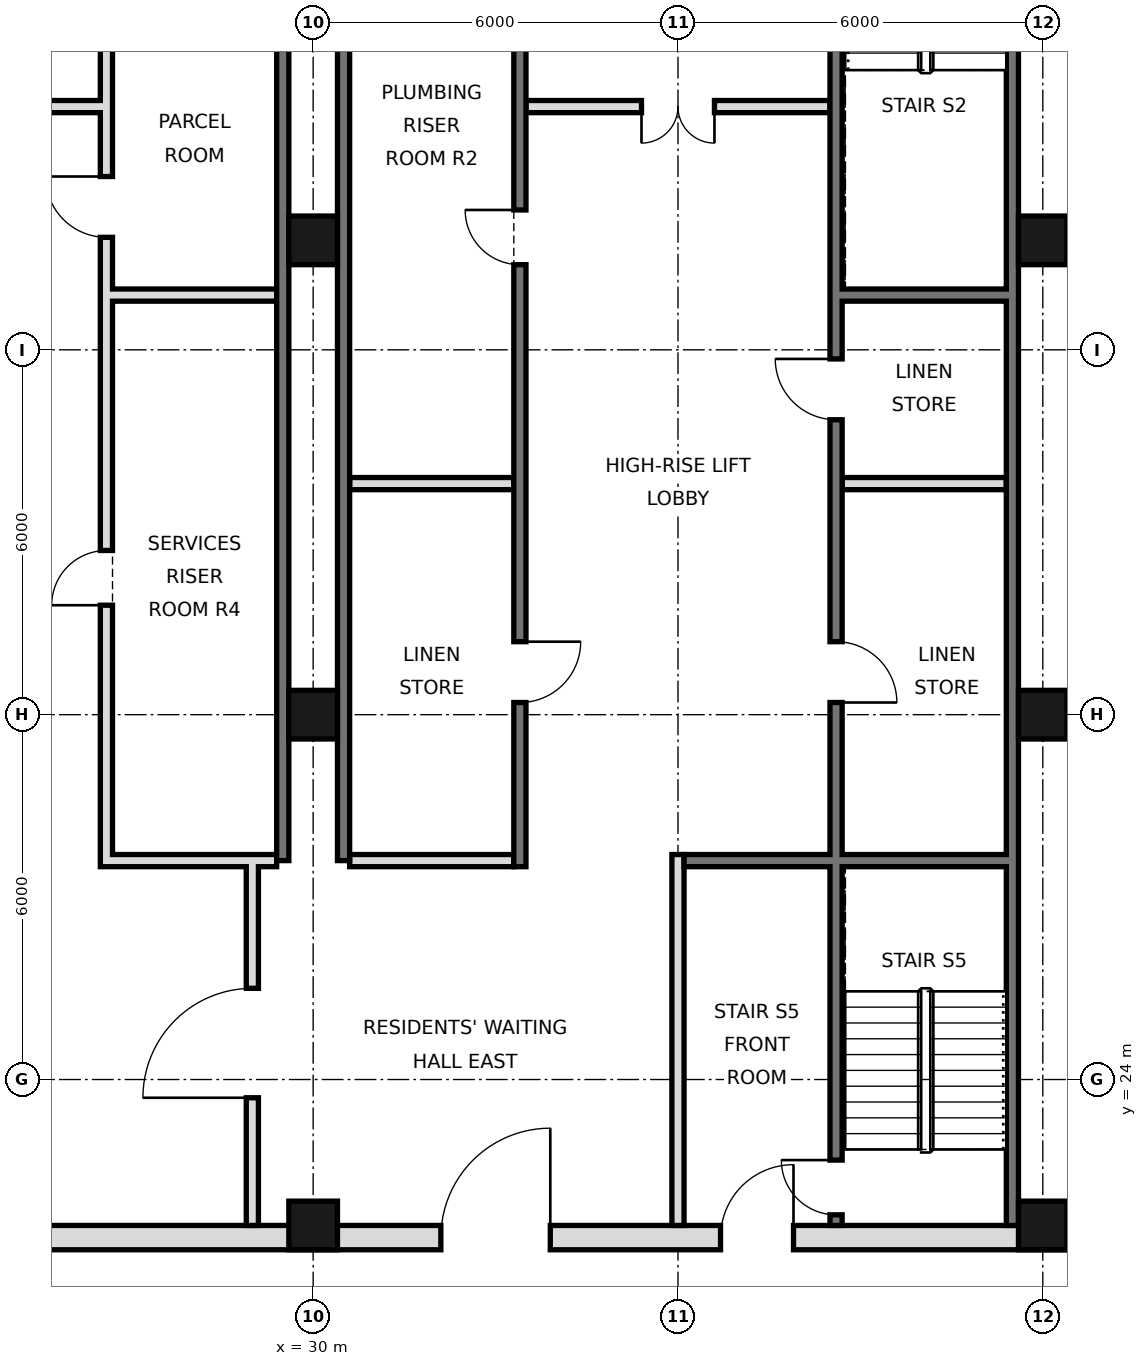
"""IFC4 building model, lengths in metres.
Left out: names, types, materials, properties, quantities, classifications, styles, units other than length and angle.
Written with IfcOpenShell. Run it as: python <this file> out.ifc"""

import sys

from ifc_helpers import new_model, si_unit, direction, frame, frame_2d, origin, origin_2d, place, context, subcontext, project, spatial, rectangle, hollow_rectangle, extrude, element, fill, save


model = new_model("IFC4")
c1 = context("Model", 3, precision=1e-05, world=origin(), true_north=direction((0.0, 1.0)))
c2 = subcontext(c1, "Body", "Model", "MODEL_VIEW")
j1 = project(units=[si_unit("LENGTHUNIT", "METRE"), si_unit("PLANEANGLEUNIT", "RADIAN")], contexts=[c1])
p1 = place(None, origin())
s1 = spatial("IfcSite", under=j1, at=p1, CompositionType="ELEMENT")
p2 = place(p1, origin())
s2 = spatial("IfcBuilding", under=s1, at=p2, CompositionType="ELEMENT")
p3 = place(p2, frame((0.0, 0.0, 130.4)))
s3 = spatial("IfcBuildingStorey", under=s2, at=p3, CompositionType="ELEMENT", Elevation=130.4)
for number, where, z_axis, x_axis in (
    (1, (30.0, 21.6, 0.0), (0.0, 0.0, 1.0), (1.0, 0.0, 0.0)),
    (2, (30.0, 30.0, 0.0), (0.0, 0.0, 1.0), (1.0, 0.0, 0.0)),
    (3, (30.0, 37.8, 0.0), (0.0, 0.0, 1.0), (1.0, 0.0, 0.0)),
    (4, (42.0, 21.6, 0.0), (0.0, 0.0, 1.0), (1.0, 0.0, 0.0)),
    (5, (42.0, 30.0, 0.0), (0.0, 0.0, 1.0), (1.0, 0.0, 0.0)),
    (6, (42.0, 37.8, 0.0), (0.0, 0.0, 1.0), (1.0, 0.0, 0.0)),
):
    element("IfcColumn", number, at=place(p3, frame(where, z_axis=z_axis, x_axis=x_axis)), inside=s3, PredefinedType="COLUMN", context=c2, shape_type="SweptSolid", body=[
        extrude(hollow_rectangle(XDim=0.8, YDim=0.8, WallThickness=0.05, at=origin_2d()), origin(), (0.0, 0.0, 1.0), 3.6),
    ])
p4 = place(p3, frame((41.5, 21.6, 0.0), z_axis=(0.0, 0.0, 1.0), x_axis=(0.0, 1.0, 0.0)))
e7 = element("IfcWall", 7, at=p4, inside=s3, PredefinedType="SOLIDWALL", context=c2, shape_type="SweptSolid", body=[
    extrude(rectangle(XDim=23.5, YDim=0.2, at=frame_2d((11.75, 0.0))), origin(), (0.0, 0.0, 1.0), 3.42),
])
for number, where, z_axis, x_axis in (
    (8, (29.5, 27.6, 0.0), (0.0, 0.0, 1.0), (0.0, 1.0, 0.0)),
    (9, (30.5, 27.6, 0.0), (0.0, 0.0, 1.0), (0.0, 1.0, 0.0)),
):
    element("IfcWall", number, at=place(p3, frame(where, z_axis=z_axis, x_axis=x_axis)), inside=s3, PredefinedType="SOLIDWALL", context=c2, shape_type="SweptSolid", body=[
        extrude(rectangle(XDim=17.5, YDim=0.2, at=frame_2d((8.75, 0.0))), origin(), (0.0, 0.0, 1.0), 3.42),
    ])
p5 = place(p3, frame((5.6, 21.4, 0.0), z_axis=(0.0, 0.0, 1.0), x_axis=(1.0, 0.0, 0.0)))
e10 = element("IfcWall", 10, at=p5, inside=s3, PredefinedType="SOLIDWALL", context=c2, shape_type="SweptSolid", body=[
    extrude(rectangle(XDim=36.8, YDim=0.4, at=frame_2d((18.4, 0.0))), origin(), (0.0, 0.0, 1.0), 3.42),
])
p6 = place(p5, frame((8.5, 0.0, 0.0)))
e11 = element("IfcOpeningElement", 11, at=p6, cuts=e10, PredefinedType="OPENING", context=c2, shape_type="SweptSolid", body=[
    extrude(rectangle(XDim=1.8, YDim=2.1, at=frame_2d((0.9, 1.05))), frame((0.0, 0.21, 0.0), z_axis=(0.0, -1.0, 0.0), x_axis=(1.0, 0.0, 0.0)), (0.0, 0.0, 1.0), 0.42),
])
p7 = place(p5, frame((17.5, 0.0, 0.0)))
e12 = element("IfcOpeningElement", 12, at=p7, cuts=e10, PredefinedType="OPENING", context=c2, shape_type="SweptSolid", body=[
    extrude(rectangle(XDim=1.8, YDim=2.1, at=frame_2d((0.9, 1.05))), frame((0.0, 0.21, 0.0), z_axis=(0.0, -1.0, 0.0), x_axis=(1.0, 0.0, 0.0)), (0.0, 0.0, 1.0), 0.42),
])
p8 = place(p5, frame((26.5, 0.0, 0.0)))
e13 = element("IfcOpeningElement", 13, at=p8, cuts=e10, PredefinedType="OPENING", context=c2, shape_type="SweptSolid", body=[
    extrude(rectangle(XDim=1.8, YDim=2.1, at=frame_2d((0.9, 1.05))), frame((0.0, 0.21, 0.0), z_axis=(0.0, -1.0, 0.0), x_axis=(1.0, 0.0, 0.0)), (0.0, 0.0, 1.0), 0.42),
])
p9 = place(p5, frame((4.5, 0.0, 0.0)))
e14 = element("IfcOpeningElement", 14, at=p9, cuts=e10, PredefinedType="OPENING", context=c2, shape_type="SweptSolid", body=[
    extrude(rectangle(XDim=1.2, YDim=2.1, at=frame_2d((0.6, 1.05))), frame((0.0, 0.21, 0.0), z_axis=(0.0, -1.0, 0.0), x_axis=(1.0, 0.0, 0.0)), (0.0, 0.0, 1.0), 0.42),
])
p10 = place(p5, frame((31.1, 0.0, 0.0)))
e15 = element("IfcOpeningElement", 15, at=p10, cuts=e10, PredefinedType="OPENING", context=c2, shape_type="SweptSolid", body=[
    extrude(rectangle(XDim=1.2, YDim=2.1, at=frame_2d((0.6, 1.05))), frame((0.0, 0.21, 0.0), z_axis=(0.0, -1.0, 0.0), x_axis=(1.0, 0.0, 0.0)), (0.0, 0.0, 1.0), 0.42),
])
p11 = place(p3, frame((29.0, 21.6, 0.0), z_axis=(0.0, 0.0, 1.0), x_axis=(0.0, 1.0, 0.0)))
e16 = element("IfcWall", 16, at=p11, inside=s3, PredefinedType="PARTITIONING", context=c2, shape_type="SweptSolid", body=[
    extrude(rectangle(XDim=6.0, YDim=0.2, at=frame_2d((3.0, 0.0))), origin(), (0.0, 0.0, 1.0), 3.42),
])
p12 = place(p11, frame((2.1, 0.0, 0.0)))
e17 = element("IfcOpeningElement", 17, at=p12, cuts=e16, PredefinedType="OPENING", context=c2, shape_type="SweptSolid", body=[
    extrude(rectangle(XDim=1.8, YDim=2.1, at=frame_2d((0.9, 1.05))), frame((0.0, 0.11, 0.0), z_axis=(0.0, -1.0, 0.0), x_axis=(1.0, 0.0, 0.0)), (0.0, 0.0, 1.0), 0.22),
])
p13 = place(p3, frame((26.6, 27.5, 0.0), z_axis=(0.0, 0.0, 1.0), x_axis=(0.0, 1.0, 0.0)))
e18 = element("IfcWall", 18, at=p13, inside=s3, PredefinedType="SOLIDWALL", context=c2, shape_type="SweptSolid", body=[
    extrude(rectangle(XDim=17.5, YDim=0.2, at=frame_2d((8.75, 0.0))), origin(), (0.0, 0.0, 1.0), 3.42),
])
p14 = place(p13, frame((4.3, 0.0, 0.0)))
e19 = element("IfcOpeningElement", 19, at=p14, cuts=e18, PredefinedType="OPENING", context=c2, shape_type="SweptSolid", body=[
    extrude(rectangle(XDim=0.9, YDim=2.1, at=frame_2d((0.45, 1.05))), frame((0.0, 0.11, 0.0), z_axis=(0.0, -1.0, 0.0), x_axis=(1.0, 0.0, 0.0)), (0.0, 0.0, 1.0), 0.22),
])
p15 = place(p13, frame((10.35, 0.0, 0.0)))
e20 = element("IfcOpeningElement", 20, at=p15, cuts=e18, PredefinedType="OPENING", context=c2, shape_type="SweptSolid", body=[
    extrude(rectangle(XDim=1.0, YDim=2.1, at=frame_2d((0.5, 1.05))), frame((0.0, 0.11, 0.0), z_axis=(0.0, -1.0, 0.0), x_axis=(1.0, 0.0, 0.0)), (0.0, 0.0, 1.0), 0.22),
])
p16 = place(p13, frame((15.475, 0.0, 0.0)))
e21 = element("IfcOpeningElement", 21, at=p16, cuts=e18, PredefinedType="OPENING", context=c2, shape_type="SweptSolid", body=[
    extrude(rectangle(XDim=1.0, YDim=2.1, at=frame_2d((0.5, 1.05))), frame((0.0, 0.11, 0.0), z_axis=(0.0, -1.0, 0.0), x_axis=(1.0, 0.0, 0.0)), (0.0, 0.0, 1.0), 0.22),
])
p17 = place(p3, frame((33.4, 27.5, 0.0), z_axis=(0.0, 0.0, 1.0), x_axis=(0.0, 1.0, 0.0)))
e22 = element("IfcWall", 22, at=p17, inside=s3, PredefinedType="SOLIDWALL", context=c2, shape_type="SweptSolid", body=[
    extrude(rectangle(XDim=17.5, YDim=0.2, at=frame_2d((8.75, 0.0))), origin(), (0.0, 0.0, 1.0), 3.42),
])
p18 = place(p17, frame((15.4, 0.0, 0.0)))
e23 = element("IfcOpeningElement", 23, at=p18, cuts=e22, PredefinedType="OPENING", context=c2, shape_type="SweptSolid", body=[
    extrude(rectangle(XDim=1.1, YDim=2.1, at=frame_2d((0.55, 1.05))), frame((0.0, 0.11, 0.0), z_axis=(0.0, -1.0, 0.0), x_axis=(1.0, 0.0, 0.0)), (0.0, 0.0, 1.0), 0.22),
])
p19 = place(p17, frame((2.7, 0.0, 0.0)))
e24 = element("IfcOpeningElement", 24, at=p19, cuts=e22, PredefinedType="OPENING", context=c2, shape_type="SweptSolid", body=[
    extrude(rectangle(XDim=1.0, YDim=2.1, at=frame_2d((0.5, 1.05))), frame((0.0, 0.11, 0.0), z_axis=(0.0, -1.0, 0.0), x_axis=(1.0, 0.0, 0.0)), (0.0, 0.0, 1.0), 0.22),
])
p20 = place(p17, frame((9.9, 0.0, 0.0)))
e25 = element("IfcOpeningElement", 25, at=p20, cuts=e22, PredefinedType="OPENING", context=c2, shape_type="SweptSolid", body=[
    extrude(rectangle(XDim=0.9, YDim=2.1, at=frame_2d((0.45, 1.05))), frame((0.0, 0.11, 0.0), z_axis=(0.0, -1.0, 0.0), x_axis=(1.0, 0.0, 0.0)), (0.0, 0.0, 1.0), 0.22),
])
p21 = place(p3, frame((36.0, 21.6, 0.0), z_axis=(0.0, 0.0, 1.0), x_axis=(0.0, 1.0, 0.0)))
e26 = element("IfcWall", 26, at=p21, inside=s3, PredefinedType="PARTITIONING", context=c2, shape_type="SweptSolid", body=[
    extrude(rectangle(XDim=6.1, YDim=0.2, at=frame_2d((3.05, 0.0))), origin(), (0.0, 0.0, 1.0), 3.42),
])
p22 = place(p3, frame((38.6, 21.6, 0.0), z_axis=(0.0, 0.0, 1.0), x_axis=(0.0, 1.0, 0.0)))
e27 = element("IfcWall", 27, at=p22, inside=s3, PredefinedType="SOLIDWALL", context=c2, shape_type="SweptSolid", body=[
    extrude(rectangle(XDim=23.4, YDim=0.2, at=frame_2d((11.7, 0.0))), origin(), (0.0, 0.0, 1.0), 3.42),
])
p23 = place(p22, frame((8.6, 0.0, 0.0)))
e28 = element("IfcOpeningElement", 28, at=p23, cuts=e27, PredefinedType="OPENING", context=c2, shape_type="SweptSolid", body=[
    extrude(rectangle(XDim=1.0, YDim=2.1, at=frame_2d((0.5, 1.05))), frame((0.0, 0.11, 0.0), z_axis=(0.0, -1.0, 0.0), x_axis=(1.0, 0.0, 0.0)), (0.0, 0.0, 1.0), 0.22),
])
p24 = place(p22, frame((13.25, 0.0, 0.0)))
e29 = element("IfcOpeningElement", 29, at=p24, cuts=e27, PredefinedType="OPENING", context=c2, shape_type="SweptSolid", body=[
    extrude(rectangle(XDim=1.0, YDim=2.1, at=frame_2d((0.5, 1.05))), frame((0.0, 0.11, 0.0), z_axis=(0.0, -1.0, 0.0), x_axis=(1.0, 0.0, 0.0)), (0.0, 0.0, 1.0), 0.22),
])
p25 = place(p22, frame((22.1, 0.0, 0.0)))
e30 = element("IfcOpeningElement", 30, at=p25, cuts=e27, PredefinedType="OPENING", context=c2, shape_type="SweptSolid", body=[
    extrude(rectangle(XDim=1.0, YDim=2.1, at=frame_2d((0.5, 1.05))), frame((0.0, 0.11, 0.0), z_axis=(0.0, -1.0, 0.0), x_axis=(1.0, 0.0, 0.0)), (0.0, 0.0, 1.0), 0.22),
])
p26 = place(p22, frame((0.175, 0.0, 0.0)))
e31 = element("IfcOpeningElement", 31, at=p26, cuts=e27, PredefinedType="OPENING", context=c2, shape_type="SweptSolid", body=[
    extrude(rectangle(XDim=0.9, YDim=2.1, at=frame_2d((0.45, 1.05))), frame((0.0, 0.11, 0.0), z_axis=(0.0, -1.0, 0.0), x_axis=(1.0, 0.0, 0.0)), (0.0, 0.0, 1.0), 0.22),
])
p27 = place(p3, frame((26.7, 27.6, 0.0), z_axis=(0.0, 0.0, 1.0), x_axis=(1.0, 0.0, 0.0)))
e32 = element("IfcWall", 32, at=p27, inside=s3, PredefinedType="SOLIDWALL", context=c2, shape_type="SweptSolid", body=[
    extrude(rectangle(XDim=2.7, YDim=0.2, at=frame_2d((1.35, 0.0))), origin(), (0.0, 0.0, 1.0), 3.42),
])
p28 = place(p3, frame((30.6, 27.6, 0.0), z_axis=(0.0, 0.0, 1.0), x_axis=(1.0, 0.0, 0.0)))
e33 = element("IfcWall", 33, at=p28, inside=s3, PredefinedType="PARTITIONING", context=c2, shape_type="SweptSolid", body=[
    extrude(rectangle(XDim=2.7, YDim=0.2, at=frame_2d((1.35, 0.0))), origin(), (0.0, 0.0, 1.0), 3.42),
])
p29 = place(p3, frame((36.1, 27.6, 0.0), z_axis=(0.0, 0.0, 1.0), x_axis=(1.0, 0.0, 0.0)))
e34 = element("IfcWall", 34, at=p29, inside=s3, PredefinedType="SOLIDWALL", context=c2, shape_type="SweptSolid", body=[
    extrude(rectangle(XDim=5.3, YDim=0.2, at=frame_2d((2.65, 0.0))), origin(), (0.0, 0.0, 1.0), 3.42),
])
p30 = place(p3, frame((30.6, 33.8, 0.0), z_axis=(0.0, 0.0, 1.0), x_axis=(1.0, 0.0, 0.0)))
e35 = element("IfcWall", 35, at=p30, inside=s3, PredefinedType="SOLIDWALL", context=c2, shape_type="SweptSolid", body=[
    extrude(rectangle(XDim=2.7, YDim=0.2, at=frame_2d((1.35, 0.0))), origin(), (0.0, 0.0, 1.0), 3.42),
])
p31 = place(p3, frame((38.7, 33.8, 0.0), z_axis=(0.0, 0.0, 1.0), x_axis=(1.0, 0.0, 0.0)))
e36 = element("IfcWall", 36, at=p31, inside=s3, PredefinedType="PARTITIONING", context=c2, shape_type="SweptSolid", body=[
    extrude(rectangle(XDim=2.7, YDim=0.2, at=frame_2d((1.35, 0.0))), origin(), (0.0, 0.0, 1.0), 3.42),
])
for number, where, z_axis, x_axis in (
    (37, (26.7, 36.9, 0.0), (0.0, 0.0, 1.0), (1.0, 0.0, 0.0)),
    (38, (38.7, 36.9, 0.0), (0.0, 0.0, 1.0), (1.0, 0.0, 0.0)),
):
    element("IfcWall", number, at=place(p3, frame(where, z_axis=z_axis, x_axis=x_axis)), inside=s3, PredefinedType="SOLIDWALL", context=c2, shape_type="SweptSolid", body=[
        extrude(rectangle(XDim=2.7, YDim=0.2, at=frame_2d((1.35, 0.0))), origin(), (0.0, 0.0, 1.0), 3.42),
    ])
p32 = place(p3, frame((21.5, 40.0, 0.0), z_axis=(0.0, 0.0, 1.0), x_axis=(1.0, 0.0, 0.0)))
e39 = element("IfcWall", 39, at=p32, inside=s3, PredefinedType="PARTITIONING", context=c2, shape_type="SweptSolid", body=[
    extrude(rectangle(XDim=5.0, YDim=0.2, at=frame_2d((2.5, 0.0))), origin(), (0.0, 0.0, 1.0), 3.42),
])
p33 = place(p32, frame((1.9, 0.0, 0.0)))
e40 = element("IfcOpeningElement", 40, at=p33, cuts=e39, PredefinedType="OPENING", context=c2, shape_type="SweptSolid", body=[
    extrude(rectangle(XDim=1.2, YDim=2.1, at=frame_2d((0.6, 1.05))), frame((0.0, 0.11, 0.0), z_axis=(0.0, -1.0, 0.0), x_axis=(1.0, 0.0, 0.0)), (0.0, 0.0, 1.0), 0.22),
])
p34 = place(p3, frame((33.5, 40.0, 0.0), z_axis=(0.0, 0.0, 1.0), x_axis=(1.0, 0.0, 0.0)))
e41 = element("IfcWall", 41, at=p34, inside=s3, PredefinedType="PARTITIONING", context=c2, shape_type="SweptSolid", body=[
    extrude(rectangle(XDim=5.0, YDim=0.2, at=frame_2d((2.5, 0.0))), origin(), (0.0, 0.0, 1.0), 3.42),
])
p35 = place(p34, frame((1.9, 0.0, 0.0)))
e42 = element("IfcOpeningElement", 42, at=p35, cuts=e41, PredefinedType="OPENING", context=c2, shape_type="SweptSolid", body=[
    extrude(rectangle(XDim=1.2, YDim=2.1, at=frame_2d((0.6, 1.05))), frame((0.0, 0.11, 0.0), z_axis=(0.0, -1.0, 0.0), x_axis=(1.0, 0.0, 0.0)), (0.0, 0.0, 1.0), 0.22),
])
p36 = place(p12, origin())
e43 = element("IfcDoor", 43, at=p36, inside=s3, OperationType="SINGLE_SWING_LEFT", PredefinedType="DOOR", context=c2, shape_type="SweptSolid", body=[
    extrude(rectangle(XDim=1.8, YDim=2.1, at=frame_2d((0.9, 1.05))), frame((0.0, 0.025, 0.0), z_axis=(0.0, -1.0, 0.0), x_axis=(1.0, 0.0, 0.0)), (0.0, 0.0, 1.0), 0.05),
])
fill(e17, e43)
p37 = place(p8, frame((1.8, 0.0, 0.0), z_axis=(0.0, 0.0, 1.0), x_axis=(-1.0, 0.0, 0.0)))
e44 = element("IfcDoor", 44, at=p37, inside=s3, OperationType="SINGLE_SWING_LEFT", PredefinedType="DOOR", context=c2, shape_type="SweptSolid", body=[
    extrude(rectangle(XDim=1.8, YDim=2.1, at=frame_2d((0.9, 1.05))), frame((0.0, 0.025, 0.0), z_axis=(0.0, -1.0, 0.0), x_axis=(1.0, 0.0, 0.0)), (0.0, 0.0, 1.0), 0.05),
])
fill(e13, e44)
p38 = place(p10, frame((1.2, 0.0, 0.0), z_axis=(0.0, 0.0, 1.0), x_axis=(-1.0, 0.0, 0.0)))
e45 = element("IfcDoor", 45, at=p38, inside=s3, OperationType="SINGLE_SWING_LEFT", PredefinedType="DOOR", context=c2, shape_type="SweptSolid", body=[
    extrude(rectangle(XDim=1.2, YDim=2.1, at=frame_2d((0.6, 1.05))), frame((0.0, 0.025, 0.0), z_axis=(0.0, -1.0, 0.0), x_axis=(1.0, 0.0, 0.0)), (0.0, 0.0, 1.0), 0.05),
])
fill(e15, e45)
p39 = place(p35, frame((1.2, 0.0, 0.0), z_axis=(0.0, 0.0, 1.0), x_axis=(-1.0, 0.0, 0.0)))
e46 = element("IfcDoor", 46, at=p39, inside=s3, OperationType="DOUBLE_DOOR_SINGLE_SWING", PredefinedType="DOOR", context=c2, shape_type="SweptSolid", body=[
    extrude(rectangle(XDim=1.2, YDim=2.1, at=frame_2d((0.6, 1.05))), frame((0.0, 0.025, 0.0), z_axis=(0.0, -1.0, 0.0), x_axis=(1.0, 0.0, 0.0)), (0.0, 0.0, 1.0), 0.05),
])
fill(e42, e46)
p40 = place(p23, frame((1.0, 0.0, 0.0), z_axis=(0.0, 0.0, 1.0), x_axis=(-1.0, 0.0, 0.0)))
e47 = element("IfcDoor", 47, at=p40, inside=s3, OperationType="SINGLE_SWING_RIGHT", PredefinedType="DOOR", context=c2, shape_type="SweptSolid", body=[
    extrude(rectangle(XDim=1.0, YDim=2.1, at=frame_2d((0.5, 1.05))), frame((0.0, 0.025, 0.0), z_axis=(0.0, -1.0, 0.0), x_axis=(1.0, 0.0, 0.0)), (0.0, 0.0, 1.0), 0.05),
])
fill(e28, e47)
p41 = place(p24, frame((1.0, 0.0, 0.0), z_axis=(0.0, 0.0, 1.0), x_axis=(-1.0, 0.0, 0.0)))
e48 = element("IfcDoor", 48, at=p41, inside=s3, OperationType="SINGLE_SWING_LEFT", PredefinedType="DOOR", context=c2, shape_type="SweptSolid", body=[
    extrude(rectangle(XDim=1.0, YDim=2.1, at=frame_2d((0.5, 1.05))), frame((0.0, 0.025, 0.0), z_axis=(0.0, -1.0, 0.0), x_axis=(1.0, 0.0, 0.0)), (0.0, 0.0, 1.0), 0.05),
])
fill(e29, e48)
p42 = place(p19, origin())
e49 = element("IfcDoor", 49, at=p42, inside=s3, OperationType="SINGLE_SWING_RIGHT", PredefinedType="DOOR", context=c2, shape_type="SweptSolid", body=[
    extrude(rectangle(XDim=1.0, YDim=2.1, at=frame_2d((0.5, 1.05))), frame((0.0, 0.025, 0.0), z_axis=(0.0, -1.0, 0.0), x_axis=(1.0, 0.0, 0.0)), (0.0, 0.0, 1.0), 0.05),
])
fill(e24, e49)
p43 = place(p26, frame((0.9, 0.0, 0.0), z_axis=(0.0, 0.0, 1.0), x_axis=(-1.0, 0.0, 0.0)))
e50 = element("IfcDoor", 50, at=p43, inside=s3, OperationType="SINGLE_SWING_LEFT", PredefinedType="DOOR", context=c2, shape_type="SweptSolid", body=[
    extrude(rectangle(XDim=0.9, YDim=2.1, at=frame_2d((0.45, 1.05))), frame((0.0, 0.025, 0.0), z_axis=(0.0, -1.0, 0.0), x_axis=(1.0, 0.0, 0.0)), (0.0, 0.0, 1.0), 0.05),
])
fill(e31, e50)
p44 = place(p20, frame((0.9, 0.0, 0.0), z_axis=(0.0, 0.0, 1.0), x_axis=(-1.0, 0.0, 0.0)))
e51 = element("IfcDoor", 51, at=p44, inside=s3, OperationType="SINGLE_SWING_LEFT", PredefinedType="DOOR", context=c2, shape_type="SweptSolid", body=[
    extrude(rectangle(XDim=0.9, YDim=2.1, at=frame_2d((0.45, 1.05))), frame((0.0, 0.025, 0.0), z_axis=(0.0, -1.0, 0.0), x_axis=(1.0, 0.0, 0.0)), (0.0, 0.0, 1.0), 0.05),
])
fill(e25, e51)
p45 = place(p14, origin())
e52 = element("IfcDoor", 52, at=p45, inside=s3, OperationType="SINGLE_SWING_LEFT", PredefinedType="DOOR", context=c2, shape_type="SweptSolid", body=[
    extrude(rectangle(XDim=0.9, YDim=2.1, at=frame_2d((0.45, 1.05))), frame((0.0, 0.025, 0.0), z_axis=(0.0, -1.0, 0.0), x_axis=(1.0, 0.0, 0.0)), (0.0, 0.0, 1.0), 0.05),
])
fill(e19, e52)
p46 = place(p15, frame((1.0, 0.0, 0.0), z_axis=(0.0, 0.0, 1.0), x_axis=(-1.0, 0.0, 0.0)))
e53 = element("IfcDoor", 53, at=p46, inside=s3, OperationType="SINGLE_SWING_LEFT", PredefinedType="DOOR", context=c2, shape_type="SweptSolid", body=[
    extrude(rectangle(XDim=1.0, YDim=2.1, at=frame_2d((0.5, 1.05))), frame((0.0, 0.025, 0.0), z_axis=(0.0, -1.0, 0.0), x_axis=(1.0, 0.0, 0.0)), (0.0, 0.0, 1.0), 0.05),
])
fill(e20, e53)
save(model, sys.argv[1])
